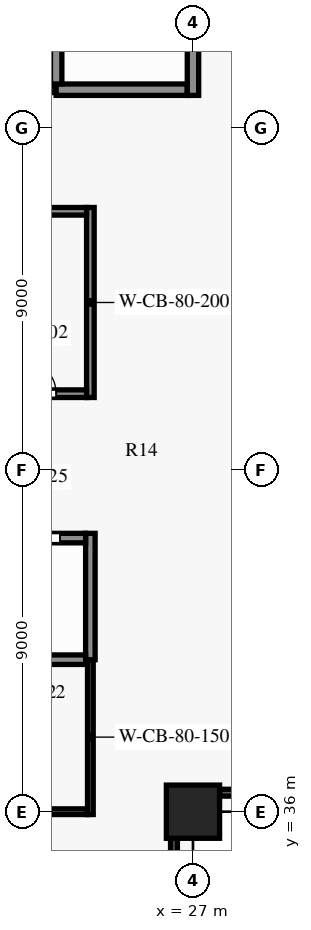
"""IFC4 building model, lengths in metres.
Left out: names, types, materials, properties, quantities, classifications, styles, units other than length and angle.
Written with IfcOpenShell. Run it as: python <this file> out.ifc"""

import sys

from ifc_helpers import new_model, si_unit, direction, frame, frame_2d, origin, origin_2d, place, context, subcontext, project, spatial, rectangle, extrude, element, fill, save


model = new_model("IFC4")
c1 = context("Model", 3, precision=1e-05, world=origin(), true_north=direction((0.0, 1.0)))
c2 = subcontext(c1, "Body", "Model", "MODEL_VIEW")
j1 = project(units=[si_unit("LENGTHUNIT", "METRE"), si_unit("PLANEANGLEUNIT", "RADIAN")], contexts=[c1])
p1 = place(None, origin())
s1 = spatial("IfcSite", under=j1, at=p1, CompositionType="ELEMENT")
p2 = place(p1, origin())
s2 = spatial("IfcBuilding", under=s1, at=p2, CompositionType="ELEMENT")
p3 = place(p2, frame((0.0, 0.0, 14.5)))
s3 = spatial("IfcBuildingStorey", under=s2, at=p3, CompositionType="ELEMENT", Elevation=14.5)
p4 = place(p3, frame((27.0, 36.0, 0.0), z_axis=(0.0, 0.0, 1.0), x_axis=(1.0, 0.0, 0.0)))
e1 = element("IfcColumn", 1, at=p4, inside=s3, PredefinedType="COLUMN", context=c2, shape_type="SweptSolid", body=[
    extrude(rectangle(XDim=1.4, YDim=1.4, at=origin_2d()), origin(), (0.0, 0.0, 1.0), 5.0),
])
p5 = place(p3, frame((12.4, 36.0, 0.0), z_axis=(0.0, 0.0, 1.0), x_axis=(1.0, 0.0, 0.0)))
e2 = element("IfcWall", 2, at=p5, inside=s3, PredefinedType="SHEAR", context=c2, shape_type="SweptSolid", body=[
    extrude(rectangle(XDim=11.825, YDim=0.15, at=frame_2d((5.913, 0.0))), origin(), (0.0, 0.0, 1.0), 4.7),
])
p6 = place(p5, frame((1.05, 0.0, 0.0)))
e3 = element("IfcOpeningElement", 3, at=p6, cuts=e2, PredefinedType="OPENING", context=c2, shape_type="SweptSolid", body=[
    extrude(rectangle(XDim=0.9, YDim=2.1, at=frame_2d((0.45, 1.05))), frame((0.0, 0.085, 0.0), z_axis=(0.0, -1.0, 0.0), x_axis=(1.0, 0.0, 0.0)), (0.0, 0.0, 1.0), 0.17),
])
p7 = place(p5, frame((4.275, 0.0, 0.0)))
e4 = element("IfcOpeningElement", 4, at=p7, cuts=e2, PredefinedType="OPENING", context=c2, shape_type="SweptSolid", body=[
    extrude(rectangle(XDim=0.95, YDim=2.1, at=frame_2d((0.475, 1.05))), frame((0.0, 0.085, 0.0), z_axis=(0.0, -1.0, 0.0), x_axis=(1.0, 0.0, 0.0)), (0.0, 0.0, 1.0), 0.17),
])
p8 = place(p5, frame((8.75, 0.0, 0.0)))
e5 = element("IfcOpeningElement", 5, at=p8, cuts=e2, PredefinedType="OPENING", context=c2, shape_type="SweptSolid", body=[
    extrude(rectangle(XDim=0.9, YDim=2.1, at=frame_2d((0.45, 1.05))), frame((0.0, 0.085, 0.0), z_axis=(0.0, -1.0, 0.0), x_axis=(1.0, 0.0, 0.0)), (0.0, 0.0, 1.0), 0.17),
])
p9 = place(p3, frame((8.1, 40.0, 0.0), z_axis=(0.0, 0.0, 1.0), x_axis=(1.0, 0.0, 0.0)))
e6 = element("IfcWall", 6, at=p9, inside=s3, PredefinedType="SHEAR", context=c2, shape_type="SweptSolid", body=[
    extrude(rectangle(XDim=16.075, YDim=0.25, at=frame_2d((8.038, 0.0))), origin(), (0.0, 0.0, 1.0), 4.7),
])
p10 = place(p3, frame((8.1, 43.2, 0.0), z_axis=(0.0, 0.0, 1.0), x_axis=(1.0, 0.0, 0.0)))
e7 = element("IfcWall", 7, at=p10, inside=s3, PredefinedType="SHEAR", context=c2, shape_type="SweptSolid", body=[
    extrude(rectangle(XDim=16.075, YDim=0.25, at=frame_2d((8.038, 0.0))), origin(), (0.0, 0.0, 1.0), 4.7),
])
p11 = place(p10, frame((14.3, 0.0, 0.0)))
e8 = element("IfcOpeningElement", 8, at=p11, cuts=e7, PredefinedType="OPENING", context=c2, shape_type="SweptSolid", body=[
    extrude(rectangle(XDim=1.1, YDim=2.1, at=frame_2d((0.55, 1.05))), frame((0.0, 0.135, 0.0), z_axis=(0.0, -1.0, 0.0), x_axis=(1.0, 0.0, 0.0)), (0.0, 0.0, 1.0), 0.27),
])
p12 = place(p10, frame((0.8, 0.0, 0.0)))
e9 = element("IfcOpeningElement", 9, at=p12, cuts=e7, PredefinedType="OPENING", context=c2, shape_type="SweptSolid", body=[
    extrude(rectangle(XDim=1.1, YDim=2.1, at=frame_2d((0.55, 1.05))), frame((0.0, 0.135, 0.0), z_axis=(0.0, -1.0, 0.0), x_axis=(1.0, 0.0, 0.0)), (0.0, 0.0, 1.0), 0.27),
])
p13 = place(p10, frame((3.5, 0.0, 0.0)))
e10 = element("IfcOpeningElement", 10, at=p13, cuts=e7, PredefinedType="OPENING", context=c2, shape_type="SweptSolid", body=[
    extrude(rectangle(XDim=1.1, YDim=2.1, at=frame_2d((0.55, 1.05))), frame((0.0, 0.135, 0.0), z_axis=(0.0, -1.0, 0.0), x_axis=(1.0, 0.0, 0.0)), (0.0, 0.0, 1.0), 0.27),
])
p14 = place(p10, frame((6.2, 0.0, 0.0)))
e11 = element("IfcOpeningElement", 11, at=p14, cuts=e7, PredefinedType="OPENING", context=c2, shape_type="SweptSolid", body=[
    extrude(rectangle(XDim=1.1, YDim=2.1, at=frame_2d((0.55, 1.05))), frame((0.0, 0.135, 0.0), z_axis=(0.0, -1.0, 0.0), x_axis=(1.0, 0.0, 0.0)), (0.0, 0.0, 1.0), 0.27),
])
p15 = place(p10, frame((8.9, 0.0, 0.0)))
e12 = element("IfcOpeningElement", 12, at=p15, cuts=e7, PredefinedType="OPENING", context=c2, shape_type="SweptSolid", body=[
    extrude(rectangle(XDim=1.1, YDim=2.1, at=frame_2d((0.55, 1.05))), frame((0.0, 0.135, 0.0), z_axis=(0.0, -1.0, 0.0), x_axis=(1.0, 0.0, 0.0)), (0.0, 0.0, 1.0), 0.27),
])
p16 = place(p10, frame((11.6, 0.0, 0.0)))
e13 = element("IfcOpeningElement", 13, at=p16, cuts=e7, PredefinedType="OPENING", context=c2, shape_type="SweptSolid", body=[
    extrude(rectangle(XDim=1.1, YDim=2.1, at=frame_2d((0.55, 1.05))), frame((0.0, 0.135, 0.0), z_axis=(0.0, -1.0, 0.0), x_axis=(1.0, 0.0, 0.0)), (0.0, 0.0, 1.0), 0.27),
])
p17 = place(p3, frame((21.6, 47.0, 0.0), z_axis=(0.0, 0.0, 1.0), x_axis=(1.0, 0.0, 0.0)))
e14 = element("IfcWall", 14, at=p17, inside=s3, PredefinedType="PARTITIONING", context=c2, shape_type="SweptSolid", body=[
    extrude(rectangle(XDim=2.6, YDim=0.2, at=frame_2d((1.3, 0.0))), origin(), (0.0, 0.0, 1.0), 4.7),
])
p18 = place(p17, frame((0.9, 0.0, 0.0)))
e15 = element("IfcOpeningElement", 15, at=p18, cuts=e14, PredefinedType="OPENING", context=c2, shape_type="SweptSolid", body=[
    extrude(rectangle(XDim=0.9, YDim=2.1, at=frame_2d((0.45, 1.05))), frame((0.0, 0.11, 0.0), z_axis=(0.0, -1.0, 0.0), x_axis=(1.0, 0.0, 0.0)), (0.0, 0.0, 1.0), 0.22),
])
p19 = place(p3, frame((21.6, 51.8, 0.0), z_axis=(0.0, 0.0, 1.0), x_axis=(1.0, 0.0, 0.0)))
e16 = element("IfcWall", 16, at=p19, inside=s3, PredefinedType="PARTITIONING", context=c2, shape_type="SweptSolid", body=[
    extrude(rectangle(XDim=2.6, YDim=0.2, at=frame_2d((1.3, 0.0))), origin(), (0.0, 0.0, 1.0), 4.7),
])
p20 = place(p3, frame((17.5, 55.0, 0.0), z_axis=(0.0, 0.0, 1.0), x_axis=(1.0, 0.0, 0.0)))
e17 = element("IfcWall", 17, at=p20, inside=s3, PredefinedType="PARTITIONING", context=c2, shape_type="SweptSolid", body=[
    extrude(rectangle(XDim=5.9, YDim=0.15, at=frame_2d((2.95, 0.0))), origin(), (0.0, 0.0, 1.0), 4.7),
])
p21 = place(p20, frame((2.45, 0.0, 0.0)))
e18 = element("IfcOpeningElement", 18, at=p21, cuts=e17, PredefinedType="OPENING", context=c2, shape_type="SweptSolid", body=[
    extrude(rectangle(XDim=1.0, YDim=2.1, at=frame_2d((0.5, 1.05))), frame((0.0, 0.085, 0.0), z_axis=(0.0, -1.0, 0.0), x_axis=(1.0, 0.0, 0.0)), (0.0, 0.0, 1.0), 0.17),
])
p22 = place(p3, frame((23.4, 55.0, 0.0), z_axis=(0.0, 0.0, 1.0), x_axis=(1.0, 0.0, 0.0)))
e19 = element("IfcWall", 19, at=p22, inside=s3, PredefinedType="SHEAR", context=c2, shape_type="SweptSolid", body=[
    extrude(rectangle(XDim=3.45, YDim=0.3, at=frame_2d((1.725, 0.0))), origin(), (0.0, 0.0, 1.0), 4.7),
])
p23 = place(p3, frame((23.4, 55.15, 0.0), z_axis=(0.0, 0.0, 1.0), x_axis=(0.0, 1.0, 0.0)))
e20 = element("IfcWall", 20, at=p23, inside=s3, PredefinedType="SHEAR", context=c2, shape_type="SweptSolid", body=[
    extrude(rectangle(XDim=8.0, YDim=0.3, at=frame_2d((4.0, 0.0))), origin(), (0.0, 0.0, 1.0), 4.7),
])
p24 = place(p3, frame((24.3, 35.925, 0.0), z_axis=(0.0, 0.0, 1.0), x_axis=(0.0, 1.0, 0.0)))
e21 = element("IfcWall", 21, at=p24, inside=s3, PredefinedType="SHEAR", context=c2, shape_type="SweptSolid", body=[
    extrude(rectangle(XDim=4.075, YDim=0.15, at=frame_2d((2.038, 0.0))), origin(), (0.0, 0.0, 1.0), 4.7),
])
p25 = place(p3, frame((24.3, 46.9, 0.0), z_axis=(0.0, 0.0, 1.0), x_axis=(0.0, 1.0, 0.0)))
e22 = element("IfcWall", 22, at=p25, inside=s3, PredefinedType="SHEAR", context=c2, shape_type="SweptSolid", body=[
    extrude(rectangle(XDim=5.0, YDim=0.2, at=frame_2d((2.5, 0.0))), origin(), (0.0, 0.0, 1.0), 4.7),
])
p26 = place(p3, frame((24.3, 40.0, 0.0), z_axis=(0.0, 0.0, 1.0), x_axis=(0.0, 1.0, 0.0)))
e23 = element("IfcWall", 23, at=p26, inside=s3, PredefinedType="SHEAR", context=c2, shape_type="SweptSolid", body=[
    extrude(rectangle(XDim=3.325, YDim=0.25, at=frame_2d((1.663, 0.0))), origin(), (0.0, 0.0, 1.0), 4.7),
])
p27 = place(p3, frame((27.0, 54.85, 0.0), z_axis=(0.0, 0.0, 1.0), x_axis=(0.0, 1.0, 0.0)))
e24 = element("IfcWall", 24, at=p27, inside=s3, PredefinedType="SHEAR", context=c2, shape_type="SweptSolid", body=[
    extrude(rectangle(XDim=8.35, YDim=0.3, at=frame_2d((4.175, 0.0))), origin(), (0.0, 0.0, 1.0), 4.7),
])
p28 = place(p27, frame((6.55, 0.0, 0.0)))
e25 = element("IfcOpeningElement", 25, at=p28, cuts=e24, PredefinedType="OPENING", context=c2, shape_type="SweptSolid", body=[
    extrude(rectangle(XDim=1.2, YDim=2.2, at=frame_2d((0.6, 1.1))), frame((0.0, 0.16, 0.0), z_axis=(0.0, -1.0, 0.0), x_axis=(1.0, 0.0, 0.0)), (0.0, 0.0, 1.0), 0.32),
])
p29 = place(p18, origin())
e26 = element("IfcDoor", 26, at=p29, inside=s3, OperationType="SINGLE_SWING_LEFT", PredefinedType="DOOR", context=c2, shape_type="SweptSolid", body=[
    extrude(rectangle(XDim=0.9, YDim=2.1, at=frame_2d((0.45, 1.05))), frame((0.0, 0.025, 0.0), z_axis=(0.0, -1.0, 0.0), x_axis=(1.0, 0.0, 0.0)), (0.0, 0.0, 1.0), 0.05),
])
fill(e15, e26)
p30 = place(p11, origin())
e27 = element("IfcDoor", 27, at=p30, inside=s3, OperationType="DOUBLE_DOOR_SLIDING", PredefinedType="DOOR", context=c2, shape_type="SweptSolid", body=[
    extrude(rectangle(XDim=1.1, YDim=2.1, at=frame_2d((0.55, 1.05))), frame((0.0, 0.025, 0.0), z_axis=(0.0, -1.0, 0.0), x_axis=(1.0, 0.0, 0.0)), (0.0, 0.0, 1.0), 0.05),
])
fill(e8, e27)
save(model, sys.argv[1])
